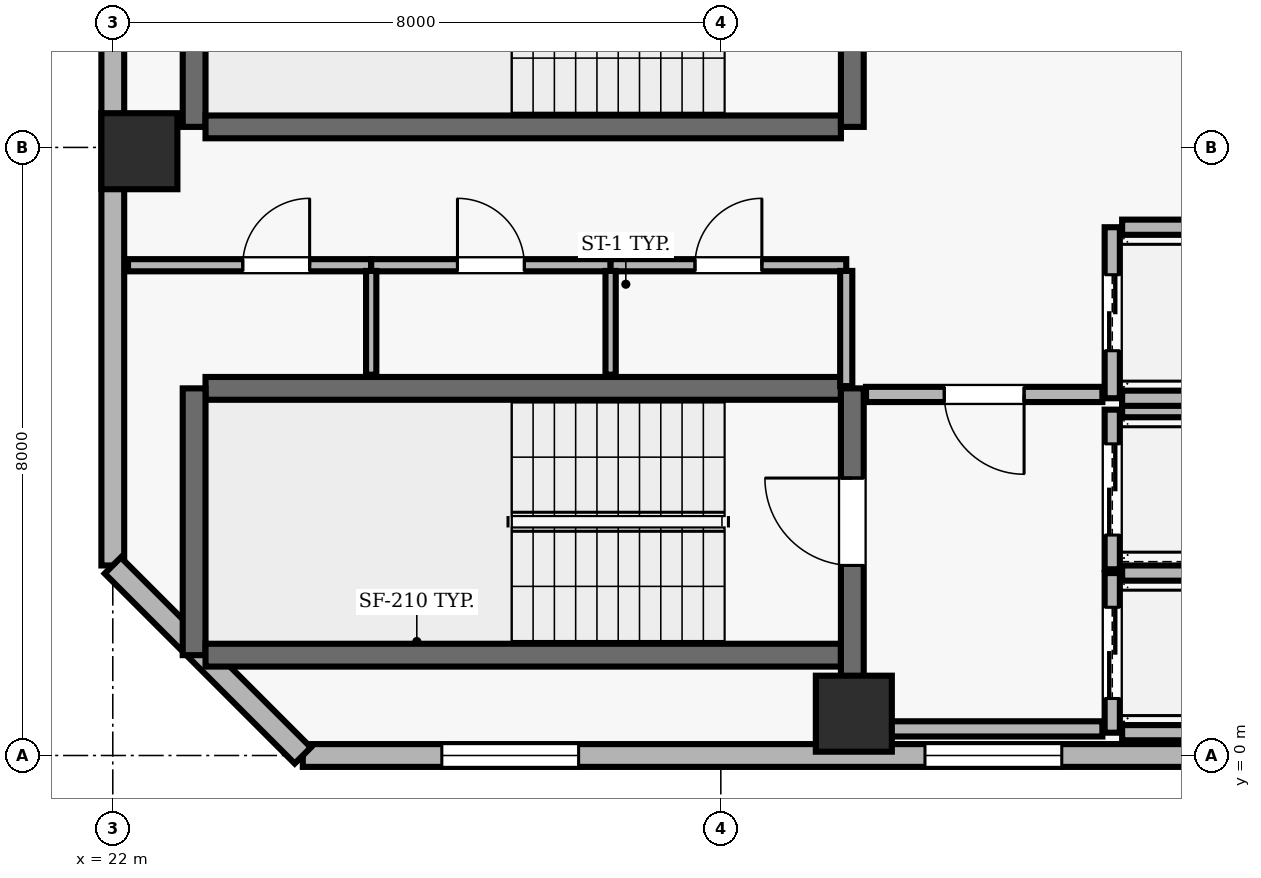
"""IFC4 building model, lengths in metres.
Left out: names, types, materials, properties, quantities, classifications, styles, units other than length and angle.
Written with IfcOpenShell. Run it as: python <this file> out.ifc"""

import sys

from ifc_helpers import new_model, si_unit, direction, frame, frame_2d, origin, origin_2d, place, context, subcontext, project, spatial, rectangle, extrude, element, fill, save


model = new_model("IFC4")
c1 = context("Model", 3, precision=1e-05, world=origin(), true_north=direction((0.0, 1.0)))
c2 = subcontext(c1, "Body", "Model", "MODEL_VIEW")
j1 = project(units=[si_unit("LENGTHUNIT", "METRE"), si_unit("PLANEANGLEUNIT", "RADIAN")], contexts=[c1])
p1 = place(None, origin())
s1 = spatial("IfcSite", under=j1, at=p1, CompositionType="ELEMENT")
p2 = place(p1, origin())
s2 = spatial("IfcBuilding", under=s1, at=p2, CompositionType="ELEMENT")
p3 = place(p2, frame((0.0, 0.0, 187.5)))
s3 = spatial("IfcBuildingStorey", under=s2, at=p3, CompositionType="ELEMENT", Elevation=187.5)
for number, where, z_axis, x_axis in (
    (1, (31.75, 0.55, 0.0), (0.0, 0.0, 1.0), (1.0, 0.0, 0.0)),
    (2, (22.35, 7.95, 0.0), (0.0, 0.0, 1.0), (1.0, 0.0, 0.0)),
):
    element("IfcColumn", number, at=place(p3, frame(where, z_axis=z_axis, x_axis=x_axis)), inside=s3, PredefinedType="COLUMN", context=c2, shape_type="SweptSolid", body=[
        extrude(rectangle(XDim=1.0, YDim=1.0, at=origin_2d()), origin(), (0.0, 0.0, 1.0), 3.9),
    ])
p4 = place(p3, frame((24.5, 0.0, 0.0), z_axis=(0.0, 0.0, 1.0), x_axis=(1.0, 0.0, 0.0)))
e3 = element("IfcWall", 3, at=p4, inside=s3, PredefinedType="SOLIDWALL", context=c2, shape_type="SweptSolid", body=[
    extrude(rectangle(XDim=38.2, YDim=0.3, at=frame_2d((19.1, 0.0))), origin(), (0.0, 0.0, 1.0), 3.69),
])
p5 = place(p4, frame((1.829, 0.0, 0.9)))
e4 = element("IfcOpeningElement", 4, at=p5, cuts=e3, PredefinedType="OPENING", context=c2, shape_type="SweptSolid", body=[
    extrude(rectangle(XDim=1.8, YDim=2.2, at=frame_2d((0.9, 1.1))), frame((0.0, 0.16, 0.0), z_axis=(0.0, -1.0, 0.0), x_axis=(1.0, 0.0, 0.0)), (0.0, 0.0, 1.0), 0.32),
])
p6 = place(p4, frame((8.186, 0.0, 0.9)))
e5 = element("IfcOpeningElement", 5, at=p6, cuts=e3, PredefinedType="OPENING", context=c2, shape_type="SweptSolid", body=[
    extrude(rectangle(XDim=1.8, YDim=2.2, at=frame_2d((0.9, 1.1))), frame((0.0, 0.16, 0.0), z_axis=(0.0, -1.0, 0.0), x_axis=(1.0, 0.0, 0.0)), (0.0, 0.0, 1.0), 0.32),
])
p7 = place(p4, frame((18.2, 0.0, 0.9)))
e6 = element("IfcOpeningElement", 6, at=p7, cuts=e3, PredefinedType="OPENING", context=c2, shape_type="SweptSolid", body=[
    extrude(rectangle(XDim=1.8, YDim=2.2, at=frame_2d((0.9, 1.1))), frame((0.0, 0.16, 0.0), z_axis=(0.0, -1.0, 0.0), x_axis=(1.0, 0.0, 0.0)), (0.0, 0.0, 1.0), 0.32),
])
p8 = place(p4, frame((23.657, 0.0, 0.9)))
e7 = element("IfcOpeningElement", 7, at=p8, cuts=e3, PredefinedType="OPENING", context=c2, shape_type="SweptSolid", body=[
    extrude(rectangle(XDim=1.8, YDim=2.2, at=frame_2d((0.9, 1.1))), frame((0.0, 0.16, 0.0), z_axis=(0.0, -1.0, 0.0), x_axis=(1.0, 0.0, 0.0)), (0.0, 0.0, 1.0), 0.32),
])
p9 = place(p4, frame((29.114, 0.0, 0.9)))
e8 = element("IfcOpeningElement", 8, at=p9, cuts=e3, PredefinedType="OPENING", context=c2, shape_type="SweptSolid", body=[
    extrude(rectangle(XDim=1.8, YDim=2.2, at=frame_2d((0.9, 1.1))), frame((0.0, 0.16, 0.0), z_axis=(0.0, -1.0, 0.0), x_axis=(1.0, 0.0, 0.0)), (0.0, 0.0, 1.0), 0.32),
])
p10 = place(p4, frame((34.571, 0.0, 0.9)))
e9 = element("IfcOpeningElement", 9, at=p10, cuts=e3, PredefinedType="OPENING", context=c2, shape_type="SweptSolid", body=[
    extrude(rectangle(XDim=1.8, YDim=2.2, at=frame_2d((0.9, 1.1))), frame((0.0, 0.16, 0.0), z_axis=(0.0, -1.0, 0.0), x_axis=(1.0, 0.0, 0.0)), (0.0, 0.0, 1.0), 0.32),
])
p11 = place(p3, frame((22.0, 40.7, 0.0), z_axis=(0.0, 0.0, 1.0), x_axis=(0.0, -1.0, 0.0)))
e10 = element("IfcWall", 10, at=p11, inside=s3, PredefinedType="SOLIDWALL", context=c2, shape_type="SweptSolid", body=[
    extrude(rectangle(XDim=38.2, YDim=0.3, at=frame_2d((19.1, 0.0))), origin(), (0.0, 0.0, 1.0), 3.69),
])
p12 = place(p11, frame((7.8, 0.0, 0.0)))
e11 = element("IfcOpeningElement", 11, at=p12, cuts=e10, PredefinedType="OPENING", context=c2, shape_type="SweptSolid", body=[
    extrude(rectangle(XDim=1.0, YDim=2.2, at=frame_2d((0.5, 1.1))), frame((0.0, 0.16, 0.0), z_axis=(0.0, -1.0, 0.0), x_axis=(1.0, 0.0, 0.0)), (0.0, 0.0, 1.0), 0.32),
])
p13 = place(p11, frame((12.293, 0.0, 0.9)))
e12 = element("IfcOpeningElement", 12, at=p13, cuts=e10, PredefinedType="OPENING", context=c2, shape_type="SweptSolid", body=[
    extrude(rectangle(XDim=1.8, YDim=2.2, at=frame_2d((0.9, 1.1))), frame((0.0, 0.16, 0.0), z_axis=(0.0, -1.0, 0.0), x_axis=(1.0, 0.0, 0.0)), (0.0, 0.0, 1.0), 0.32),
])
p14 = place(p11, frame((18.2, 0.0, 0.9)))
e13 = element("IfcOpeningElement", 13, at=p14, cuts=e10, PredefinedType="OPENING", context=c2, shape_type="SweptSolid", body=[
    extrude(rectangle(XDim=1.8, YDim=2.2, at=frame_2d((0.9, 1.1))), frame((0.0, 0.16, 0.0), z_axis=(0.0, -1.0, 0.0), x_axis=(1.0, 0.0, 0.0)), (0.0, 0.0, 1.0), 0.32),
])
p15 = place(p11, frame((23.207, 0.0, 0.9)))
e14 = element("IfcOpeningElement", 14, at=p15, cuts=e10, PredefinedType="OPENING", context=c2, shape_type="SweptSolid", body=[
    extrude(rectangle(XDim=1.8, YDim=2.2, at=frame_2d((0.9, 1.1))), frame((0.0, 0.16, 0.0), z_axis=(0.0, -1.0, 0.0), x_axis=(1.0, 0.0, 0.0)), (0.0, 0.0, 1.0), 0.32),
])
p16 = place(p11, frame((29.114, 0.0, 0.9)))
e15 = element("IfcOpeningElement", 15, at=p16, cuts=e10, PredefinedType="OPENING", context=c2, shape_type="SweptSolid", body=[
    extrude(rectangle(XDim=1.8, YDim=2.2, at=frame_2d((0.9, 1.1))), frame((0.0, 0.16, 0.0), z_axis=(0.0, -1.0, 0.0), x_axis=(1.0, 0.0, 0.0)), (0.0, 0.0, 1.0), 0.32),
])
p17 = place(p3, frame((22.0, 2.5, 0.0), z_axis=(0.0, 0.0, 1.0), x_axis=(0.707106781187, -0.707106781187, 0.0)))
e16 = element("IfcWall", 16, at=p17, inside=s3, PredefinedType="SOLIDWALL", context=c2, shape_type="SweptSolid", body=[
    extrude(rectangle(XDim=3.536, YDim=0.3, at=frame_2d((1.768, 0.0))), origin(), (0.0, 0.0, 1.0), 3.69),
])
p18 = place(p3, frame((31.58, 4.83, 0.0), z_axis=(0.0, 0.0, 1.0), x_axis=(-1.0, 0.0, 0.0)))
e17 = element("IfcWall", 17, at=p18, inside=s3, PredefinedType="SHEAR", context=c2, shape_type="SweptSolid", body=[
    extrude(rectangle(XDim=8.36, YDim=0.3, at=frame_2d((4.18, 0.0))), origin(), (0.0, 0.0, 1.0), 3.69),
])
p19 = place(p3, frame((23.07, 4.83, 0.0), z_axis=(0.0, 0.0, 1.0), x_axis=(0.0, -1.0, 0.0)))
e18 = element("IfcWall", 18, at=p19, inside=s3, PredefinedType="SHEAR", context=c2, shape_type="SweptSolid", body=[
    extrude(rectangle(XDim=3.51, YDim=0.3, at=frame_2d((1.755, 0.0))), origin(), (0.0, 0.0, 1.0), 3.69),
])
p20 = place(p3, frame((23.22, 1.32, 0.0), z_axis=(0.0, 0.0, 1.0), x_axis=(1.0, 0.0, 0.0)))
e19 = element("IfcWall", 19, at=p20, inside=s3, PredefinedType="SHEAR", context=c2, shape_type="SweptSolid", body=[
    extrude(rectangle(XDim=8.36, YDim=0.3, at=frame_2d((4.18, 0.0))), origin(), (0.0, 0.0, 1.0), 3.69),
])
p21 = place(p3, frame((31.73, 0.96, 0.0), z_axis=(0.0, 0.0, 1.0), x_axis=(0.0, 1.0, 0.0)))
e20 = element("IfcWall", 20, at=p21, inside=s3, PredefinedType="SHEAR", context=c2, shape_type="SweptSolid", body=[
    extrude(rectangle(XDim=3.87, YDim=0.3, at=frame_2d((1.935, 0.0))), origin(), (0.0, 0.0, 1.0), 3.69),
])
p22 = place(p21, frame((1.54, 0.0, 0.0)))
e21 = element("IfcOpeningElement", 21, at=p22, cuts=e20, PredefinedType="OPENING", context=c2, shape_type="SweptSolid", body=[
    extrude(rectangle(XDim=1.15, YDim=2.15, at=frame_2d((0.575, 1.075))), frame((0.0, 0.16, 0.0), z_axis=(0.0, -1.0, 0.0), x_axis=(1.0, 0.0, 0.0)), (0.0, 0.0, 1.0), 0.32),
])
p23 = place(p3, frame((23.07, 11.78, 0.0), z_axis=(0.0, 0.0, 1.0), x_axis=(0.0, -1.0, 0.0)))
e22 = element("IfcWall", 22, at=p23, inside=s3, PredefinedType="SHEAR", context=c2, shape_type="SweptSolid", body=[
    extrude(rectangle(XDim=3.51, YDim=0.3, at=frame_2d((1.755, 0.0))), origin(), (0.0, 0.0, 1.0), 3.69),
])
p24 = place(p3, frame((23.22, 8.27, 0.0), z_axis=(0.0, 0.0, 1.0), x_axis=(1.0, 0.0, 0.0)))
e23 = element("IfcWall", 23, at=p24, inside=s3, PredefinedType="SHEAR", context=c2, shape_type="SweptSolid", body=[
    extrude(rectangle(XDim=8.36, YDim=0.3, at=frame_2d((4.18, 0.0))), origin(), (0.0, 0.0, 1.0), 3.69),
])
p25 = place(p3, frame((31.73, 8.27, 0.0), z_axis=(0.0, 0.0, 1.0), x_axis=(0.0, 1.0, 0.0)))
e24 = element("IfcWall", 24, at=p25, inside=s3, PredefinedType="SHEAR", context=c2, shape_type="SweptSolid", body=[
    extrude(rectangle(XDim=3.51, YDim=0.3, at=frame_2d((1.755, 0.0))), origin(), (0.0, 0.0, 1.0), 3.69),
])
p26 = place(p25, frame((1.18, 0.0, 0.0)))
e25 = element("IfcOpeningElement", 25, at=p26, cuts=e24, PredefinedType="OPENING", context=c2, shape_type="SweptSolid", body=[
    extrude(rectangle(XDim=1.15, YDim=2.15, at=frame_2d((0.575, 1.075))), frame((0.0, 0.16, 0.0), z_axis=(0.0, -1.0, 0.0), x_axis=(1.0, 0.0, 0.0)), (0.0, 0.0, 1.0), 0.32),
])
p27 = place(p3, frame((35.15, 2.4, 0.0), z_axis=(0.0, 0.0, 1.0), x_axis=(0.0, -1.0, 0.0)))
e26 = element("IfcWall", 26, at=p27, inside=s3, PredefinedType="SOLIDWALL", context=c2, shape_type="SweptSolid", body=[
    extrude(rectangle(XDim=2.1, YDim=0.2, at=frame_2d((1.05, 0.0))), origin(), (0.0, 0.0, 1.0), 3.69),
])
p28 = place(p27, frame((0.45, 0.0, 0.0)))
e27 = element("IfcOpeningElement", 27, at=p28, cuts=e26, PredefinedType="OPENING", context=c2, shape_type="SweptSolid", body=[
    extrude(rectangle(XDim=1.2, YDim=2.15, at=frame_2d((0.6, 1.075))), frame((0.0, 0.11, 0.0), z_axis=(0.0, -1.0, 0.0), x_axis=(1.0, 0.0, 0.0)), (0.0, 0.0, 1.0), 0.22),
])
for number, where, z_axis, x_axis in (
    (28, (35.28, 0.3, 0.0), (0.0, 0.0, 1.0), (1.0, 0.0, 0.0)),
    (29, (37.42, 2.4, 0.0), (0.0, 0.0, 1.0), (-1.0, 0.0, 0.0)),
):
    element("IfcWall", number, at=place(p3, frame(where, z_axis=z_axis, x_axis=x_axis)), inside=s3, PredefinedType="SOLIDWALL", context=c2, shape_type="SweptSolid", body=[
        extrude(rectangle(XDim=2.14, YDim=0.2, at=frame_2d((1.07, 0.0))), origin(), (0.0, 0.0, 1.0), 3.69),
    ])
p29 = place(p3, frame((35.15, 4.55, 0.0), z_axis=(0.0, 0.0, 1.0), x_axis=(0.0, -1.0, 0.0)))
e30 = element("IfcWall", 30, at=p29, inside=s3, PredefinedType="SOLIDWALL", context=c2, shape_type="SweptSolid", body=[
    extrude(rectangle(XDim=2.1, YDim=0.2, at=frame_2d((1.05, 0.0))), origin(), (0.0, 0.0, 1.0), 3.69),
])
p30 = place(p29, frame((0.45, 0.0, 0.0)))
e31 = element("IfcOpeningElement", 31, at=p30, cuts=e30, PredefinedType="OPENING", context=c2, shape_type="SweptSolid", body=[
    extrude(rectangle(XDim=1.2, YDim=2.15, at=frame_2d((0.6, 1.075))), frame((0.0, 0.11, 0.0), z_axis=(0.0, -1.0, 0.0), x_axis=(1.0, 0.0, 0.0)), (0.0, 0.0, 1.0), 0.22),
])
p31 = place(p3, frame((37.42, 4.55, 0.0), z_axis=(0.0, 0.0, 1.0), x_axis=(-1.0, 0.0, 0.0)))
e32 = element("IfcWall", 32, at=p31, inside=s3, PredefinedType="SOLIDWALL", context=c2, shape_type="SweptSolid", body=[
    extrude(rectangle(XDim=2.14, YDim=0.2, at=frame_2d((1.07, 0.0))), origin(), (0.0, 0.0, 1.0), 3.69),
])
p32 = place(p3, frame((35.15, 6.95, 0.0), z_axis=(0.0, 0.0, 1.0), x_axis=(0.0, -1.0, 0.0)))
e33 = element("IfcWall", 33, at=p32, inside=s3, PredefinedType="SOLIDWALL", context=c2, shape_type="SweptSolid", body=[
    extrude(rectangle(XDim=2.25, YDim=0.2, at=frame_2d((1.125, 0.0))), origin(), (0.0, 0.0, 1.0), 3.69),
])
p33 = place(p32, frame((0.625, 0.0, 0.0)))
e34 = element("IfcOpeningElement", 34, at=p33, cuts=e33, PredefinedType="OPENING", context=c2, shape_type="SweptSolid", body=[
    extrude(rectangle(XDim=1.0, YDim=2.1, at=frame_2d((0.5, 1.05))), frame((0.0, 0.11, 0.0), z_axis=(0.0, -1.0, 0.0), x_axis=(1.0, 0.0, 0.0)), (0.0, 0.0, 1.0), 0.22),
])
for number, where, z_axis, x_axis in (
    (35, (35.28, 4.7, 0.0), (0.0, 0.0, 1.0), (1.0, 0.0, 0.0)),
    (36, (37.42, 6.95, 0.0), (0.0, 0.0, 1.0), (-1.0, 0.0, 0.0)),
):
    element("IfcWall", number, at=place(p3, frame(where, z_axis=z_axis, x_axis=x_axis)), inside=s3, PredefinedType="SOLIDWALL", context=c2, shape_type="SweptSolid", body=[
        extrude(rectangle(XDim=2.14, YDim=0.2, at=frame_2d((1.07, 0.0))), origin(), (0.0, 0.0, 1.0), 3.69),
    ])
p34 = place(p3, frame((22.2, 6.45, 0.0), z_axis=(0.0, 0.0, 1.0), x_axis=(1.0, 0.0, 0.0)))
e37 = element("IfcWall", 37, at=p34, inside=s3, PredefinedType="PARTITIONING", context=c2, shape_type="SweptSolid", body=[
    extrude(rectangle(XDim=3.2, YDim=0.16, at=frame_2d((1.6, 0.0))), origin(), (0.0, 0.0, 1.0), 3.69),
])
p35 = place(p34, frame((1.51, 0.0, 0.0)))
e38 = element("IfcOpeningElement", 38, at=p35, cuts=e37, PredefinedType="OPENING", context=c2, shape_type="SweptSolid", body=[
    extrude(rectangle(XDim=0.88, YDim=2.1, at=frame_2d((0.44, 1.05))), frame((0.0, 0.09, 0.0), z_axis=(0.0, -1.0, 0.0), x_axis=(1.0, 0.0, 0.0)), (0.0, 0.0, 1.0), 0.18),
])
p36 = place(p3, frame((25.4, 6.45, 0.0), z_axis=(0.0, 0.0, 1.0), x_axis=(1.0, 0.0, 0.0)))
e39 = element("IfcWall", 39, at=p36, inside=s3, PredefinedType="PARTITIONING", context=c2, shape_type="SweptSolid", body=[
    extrude(rectangle(XDim=3.15, YDim=0.16, at=frame_2d((1.575, 0.0))), origin(), (0.0, 0.0, 1.0), 3.69),
])
p37 = place(p36, frame((1.135, 0.0, 0.0)))
e40 = element("IfcOpeningElement", 40, at=p37, cuts=e39, PredefinedType="OPENING", context=c2, shape_type="SweptSolid", body=[
    extrude(rectangle(XDim=0.88, YDim=2.1, at=frame_2d((0.44, 1.05))), frame((0.0, 0.09, 0.0), z_axis=(0.0, -1.0, 0.0), x_axis=(1.0, 0.0, 0.0)), (0.0, 0.0, 1.0), 0.18),
])
p38 = place(p3, frame((28.55, 6.45, 0.0), z_axis=(0.0, 0.0, 1.0), x_axis=(1.0, 0.0, 0.0)))
e41 = element("IfcWall", 41, at=p38, inside=s3, PredefinedType="PARTITIONING", context=c2, shape_type="SweptSolid", body=[
    extrude(rectangle(XDim=3.1, YDim=0.16, at=frame_2d((1.55, 0.0))), origin(), (0.0, 0.0, 1.0), 3.69),
])
p39 = place(p38, frame((1.11, 0.0, 0.0)))
e42 = element("IfcOpeningElement", 42, at=p39, cuts=e41, PredefinedType="OPENING", context=c2, shape_type="SweptSolid", body=[
    extrude(rectangle(XDim=0.88, YDim=2.1, at=frame_2d((0.44, 1.05))), frame((0.0, 0.09, 0.0), z_axis=(0.0, -1.0, 0.0), x_axis=(1.0, 0.0, 0.0)), (0.0, 0.0, 1.0), 0.18),
])
p40 = place(p3, frame((31.65, 0.35, 0.0), z_axis=(0.0, 0.0, 1.0), x_axis=(1.0, 0.0, 0.0)))
e43 = element("IfcWall", 43, at=p40, inside=s3, PredefinedType="SOLIDWALL", context=c2, shape_type="SweptSolid", body=[
    extrude(rectangle(XDim=3.37, YDim=0.2, at=frame_2d((1.685, 0.0))), origin(), (0.0, 0.0, 1.0), 3.69),
])
p41 = place(p3, frame((35.02, 4.75, 0.0), z_axis=(0.0, 0.0, 1.0), x_axis=(-1.0, 0.0, 0.0)))
e44 = element("IfcWall", 44, at=p41, inside=s3, PredefinedType="SOLIDWALL", context=c2, shape_type="SweptSolid", body=[
    extrude(rectangle(XDim=3.11, YDim=0.2, at=frame_2d((1.555, 0.0))), origin(), (0.0, 0.0, 1.0), 3.69),
])
p42 = place(p41, frame((1.03, 0.0, 0.0)))
e45 = element("IfcOpeningElement", 45, at=p42, cuts=e44, PredefinedType="OPENING", context=c2, shape_type="SweptSolid", body=[
    extrude(rectangle(XDim=1.05, YDim=2.15, at=frame_2d((0.525, 1.075))), frame((0.0, 0.11, 0.0), z_axis=(0.0, -1.0, 0.0), x_axis=(1.0, 0.0, 0.0)), (0.0, 0.0, 1.0), 0.22),
])
for number, where, z_axis, x_axis in (
    (46, (25.4, 5.01, 0.0), (0.0, 0.0, 1.0), (0.0, 1.0, 0.0)),
    (47, (28.55, 5.01, 0.0), (0.0, 0.0, 1.0), (0.0, 1.0, 0.0)),
):
    element("IfcWall", number, at=place(p3, frame(where, z_axis=z_axis, x_axis=x_axis)), inside=s3, PredefinedType="PARTITIONING", context=c2, shape_type="SweptSolid", body=[
        extrude(rectangle(XDim=1.365, YDim=0.135, at=frame_2d((0.683, 0.0))), origin(), (0.0, 0.0, 1.0), 3.69),
    ])
p43 = place(p3, frame((31.65, 4.86, 0.0), z_axis=(0.0, 0.0, 1.0), x_axis=(0.0, 1.0, 0.0)))
e48 = element("IfcWall", 48, at=p43, inside=s3, PredefinedType="PARTITIONING", context=c2, shape_type="SweptSolid", body=[
    extrude(rectangle(XDim=1.515, YDim=0.16, at=frame_2d((0.757, 0.0))), origin(), (0.0, 0.0, 1.0), 3.69),
])
p44 = place(p5, origin())
e49 = element("IfcWindow", 49, at=p44, inside=s3, PartitioningType="SINGLE_PANEL", PredefinedType="WINDOW", context=c2, shape_type="SweptSolid", body=[
    extrude(rectangle(XDim=1.8, YDim=2.2, at=frame_2d((0.9, 1.1))), frame((0.0, 0.03, 0.0), z_axis=(0.0, -1.0, 0.0), x_axis=(1.0, 0.0, 0.0)), (0.0, 0.0, 1.0), 0.06),
])
fill(e4, e49)
p45 = place(p6, origin())
e50 = element("IfcWindow", 50, at=p45, inside=s3, PartitioningType="SINGLE_PANEL", PredefinedType="WINDOW", context=c2, shape_type="SweptSolid", body=[
    extrude(rectangle(XDim=1.8, YDim=2.2, at=frame_2d((0.9, 1.1))), frame((0.0, 0.03, 0.0), z_axis=(0.0, -1.0, 0.0), x_axis=(1.0, 0.0, 0.0)), (0.0, 0.0, 1.0), 0.06),
])
fill(e5, e50)
p46 = place(p22, origin())
e51 = element("IfcDoor", 51, at=p46, inside=s3, OperationType="SINGLE_SWING_RIGHT", PredefinedType="DOOR", context=c2, shape_type="SweptSolid", body=[
    extrude(rectangle(XDim=1.15, YDim=2.15, at=frame_2d((0.575, 1.075))), frame((0.0, 0.025, 0.0), z_axis=(0.0, -1.0, 0.0), x_axis=(1.0, 0.0, 0.0)), (0.0, 0.0, 1.0), 0.05),
])
fill(e21, e51)
p47 = place(p28, origin())
e52 = element("IfcDoor", 52, at=p47, inside=s3, OperationType="DOUBLE_DOOR_SLIDING", PredefinedType="DOOR", context=c2, shape_type="SweptSolid", body=[
    extrude(rectangle(XDim=1.2, YDim=2.15, at=frame_2d((0.6, 1.075))), frame((0.0, 0.025, 0.0), z_axis=(0.0, -1.0, 0.0), x_axis=(1.0, 0.0, 0.0)), (0.0, 0.0, 1.0), 0.05),
])
fill(e27, e52)
p48 = place(p30, origin())
e53 = element("IfcDoor", 53, at=p48, inside=s3, OperationType="DOUBLE_DOOR_SLIDING", PredefinedType="DOOR", context=c2, shape_type="SweptSolid", body=[
    extrude(rectangle(XDim=1.2, YDim=2.15, at=frame_2d((0.6, 1.075))), frame((0.0, 0.025, 0.0), z_axis=(0.0, -1.0, 0.0), x_axis=(1.0, 0.0, 0.0)), (0.0, 0.0, 1.0), 0.05),
])
fill(e31, e53)
p49 = place(p33, origin())
e54 = element("IfcDoor", 54, at=p49, inside=s3, OperationType="DOUBLE_DOOR_SLIDING", PredefinedType="DOOR", context=c2, shape_type="SweptSolid", body=[
    extrude(rectangle(XDim=1.0, YDim=2.1, at=frame_2d((0.5, 1.05))), frame((0.0, 0.025, 0.0), z_axis=(0.0, -1.0, 0.0), x_axis=(1.0, 0.0, 0.0)), (0.0, 0.0, 1.0), 0.05),
])
fill(e34, e54)
p50 = place(p42, origin())
e55 = element("IfcDoor", 55, at=p50, inside=s3, OperationType="SINGLE_SWING_LEFT", PredefinedType="DOOR", context=c2, shape_type="SweptSolid", body=[
    extrude(rectangle(XDim=1.05, YDim=2.15, at=frame_2d((0.525, 1.075))), frame((0.0, 0.025, 0.0), z_axis=(0.0, -1.0, 0.0), x_axis=(1.0, 0.0, 0.0)), (0.0, 0.0, 1.0), 0.05),
])
fill(e45, e55)
p51 = place(p35, origin())
e56 = element("IfcDoor", 56, at=p51, inside=s3, OperationType="SINGLE_SWING_RIGHT", PredefinedType="DOOR", context=c2, shape_type="SweptSolid", body=[
    extrude(rectangle(XDim=0.88, YDim=2.1, at=frame_2d((0.44, 1.05))), frame((0.0, 0.025, 0.0), z_axis=(0.0, -1.0, 0.0), x_axis=(1.0, 0.0, 0.0)), (0.0, 0.0, 1.0), 0.05),
])
fill(e38, e56)
p52 = place(p37, origin())
e57 = element("IfcDoor", 57, at=p52, inside=s3, OperationType="SINGLE_SWING_LEFT", PredefinedType="DOOR", context=c2, shape_type="SweptSolid", body=[
    extrude(rectangle(XDim=0.88, YDim=2.1, at=frame_2d((0.44, 1.05))), frame((0.0, 0.025, 0.0), z_axis=(0.0, -1.0, 0.0), x_axis=(1.0, 0.0, 0.0)), (0.0, 0.0, 1.0), 0.05),
])
fill(e40, e57)
p53 = place(p39, origin())
e58 = element("IfcDoor", 58, at=p53, inside=s3, OperationType="SINGLE_SWING_RIGHT", PredefinedType="DOOR", context=c2, shape_type="SweptSolid", body=[
    extrude(rectangle(XDim=0.88, YDim=2.1, at=frame_2d((0.44, 1.05))), frame((0.0, 0.025, 0.0), z_axis=(0.0, -1.0, 0.0), x_axis=(1.0, 0.0, 0.0)), (0.0, 0.0, 1.0), 0.05),
])
fill(e42, e58)
save(model, sys.argv[1])
